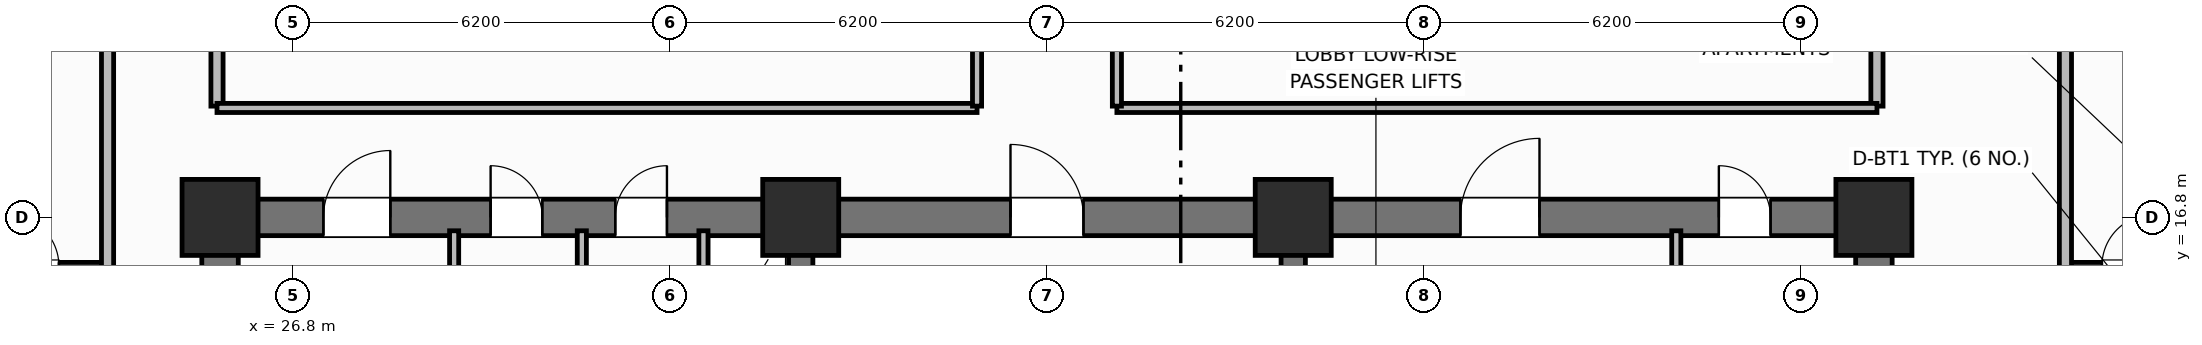
"""IFC4 building model, lengths in metres.
Left out: names, types, materials, properties, quantities, classifications, styles, units other than length and angle.
Written with IfcOpenShell. Run it as: python <this file> out.ifc"""

import sys

from ifc_helpers import new_model, si_unit, direction, frame, frame_2d, origin, origin_2d, place, context, subcontext, project, spatial, rectangle, extrude, element, fill, save


model = new_model("IFC4")
c1 = context("Model", 3, precision=1e-05, world=origin(), true_north=direction((0.0, 1.0)))
c2 = subcontext(c1, "Body", "Model", "MODEL_VIEW")
j1 = project(units=[si_unit("LENGTHUNIT", "METRE"), si_unit("PLANEANGLEUNIT", "RADIAN")], contexts=[c1])
p1 = place(None, origin())
s1 = spatial("IfcSite", under=j1, at=p1, CompositionType="ELEMENT")
p2 = place(p1, origin())
s2 = spatial("IfcBuilding", under=s1, at=p2, CompositionType="ELEMENT")
p3 = place(p2, frame((0.0, 0.0, 69.5)))
s3 = spatial("IfcBuildingStorey", under=s2, at=p3, CompositionType="ELEMENT", Elevation=69.5)
for number, where, z_axis, x_axis in (
    (1, (25.6, 10.9, 0.0), (0.0, 0.0, 1.0), (0.0, 1.0, 0.0)),
    (2, (52.8, 10.9, 0.0), (0.0, 0.0, 1.0), (0.0, 1.0, 0.0)),
):
    element("IfcWall", number, at=place(p3, frame(where, z_axis=z_axis, x_axis=x_axis)), inside=s3, PredefinedType="SHEAR", context=c2, shape_type="SweptSolid", body=[
        extrude(rectangle(XDim=5.6, YDim=0.6, at=frame_2d((2.8, 0.0))), origin(), (0.0, 0.0, 1.0), 3.7),
    ])
p4 = place(p3, frame((25.6, 16.8, 0.0), z_axis=(0.0, 0.0, 1.0), x_axis=(1.0, 0.0, 0.0)))
e3 = element("IfcWall", 3, at=p4, inside=s3, PredefinedType="SHEAR", context=c2, shape_type="SweptSolid", body=[
    extrude(rectangle(XDim=27.2, YDim=0.6, at=frame_2d((13.6, 0.0))), origin(), (0.0, 0.0, 1.0), 3.7),
])
p5 = place(p4, frame((1.7, 0.0, 0.0)))
e4 = element("IfcOpeningElement", 4, at=p5, cuts=e3, PredefinedType="OPENING", context=c2, shape_type="SweptSolid", body=[
    extrude(rectangle(XDim=1.1, YDim=2.15, at=frame_2d((0.55, 1.075))), frame((0.0, 0.31, 0.0), z_axis=(0.0, -1.0, 0.0), x_axis=(1.0, 0.0, 0.0)), (0.0, 0.0, 1.0), 0.62),
])
p6 = place(p4, frame((4.45, 0.0, 0.0)))
e5 = element("IfcOpeningElement", 5, at=p6, cuts=e3, PredefinedType="OPENING", context=c2, shape_type="SweptSolid", body=[
    extrude(rectangle(XDim=0.85, YDim=2.1, at=frame_2d((0.425, 1.05))), frame((0.0, 0.31, 0.0), z_axis=(0.0, -1.0, 0.0), x_axis=(1.0, 0.0, 0.0)), (0.0, 0.0, 1.0), 0.62),
])
p7 = place(p4, frame((6.5, 0.0, 0.0)))
e6 = element("IfcOpeningElement", 6, at=p7, cuts=e3, PredefinedType="OPENING", context=c2, shape_type="SweptSolid", body=[
    extrude(rectangle(XDim=0.85, YDim=2.1, at=frame_2d((0.425, 1.05))), frame((0.0, 0.31, 0.0), z_axis=(0.0, -1.0, 0.0), x_axis=(1.0, 0.0, 0.0)), (0.0, 0.0, 1.0), 0.62),
])
p8 = place(p4, frame((13.0, 0.0, 0.0)))
e7 = element("IfcOpeningElement", 7, at=p8, cuts=e3, PredefinedType="OPENING", context=c2, shape_type="SweptSolid", body=[
    extrude(rectangle(XDim=1.2, YDim=2.15, at=frame_2d((0.6, 1.075))), frame((0.0, 0.31, 0.0), z_axis=(0.0, -1.0, 0.0), x_axis=(1.0, 0.0, 0.0)), (0.0, 0.0, 1.0), 0.62),
])
p9 = place(p4, frame((20.4, 0.0, 0.0)))
e8 = element("IfcOpeningElement", 8, at=p9, cuts=e3, PredefinedType="OPENING", context=c2, shape_type="SweptSolid", body=[
    extrude(rectangle(XDim=1.3, YDim=2.2, at=frame_2d((0.65, 1.1))), frame((0.0, 0.31, 0.0), z_axis=(0.0, -1.0, 0.0), x_axis=(1.0, 0.0, 0.0)), (0.0, 0.0, 1.0), 0.62),
])
p10 = place(p4, frame((24.65, 0.0, 0.0)))
e9 = element("IfcOpeningElement", 9, at=p10, cuts=e3, PredefinedType="OPENING", context=c2, shape_type="SweptSolid", body=[
    extrude(rectangle(XDim=0.85, YDim=2.1, at=frame_2d((0.425, 1.05))), frame((0.0, 0.31, 0.0), z_axis=(0.0, -1.0, 0.0), x_axis=(1.0, 0.0, 0.0)), (0.0, 0.0, 1.0), 0.62),
])
for number, where, z_axis, x_axis in (
    (10, (35.15, 10.9, 0.0), (0.0, 0.0, 1.0), (0.0, 1.0, 0.0)),
    (11, (43.25, 10.9, 0.0), (0.0, 0.0, 1.0), (0.0, 1.0, 0.0)),
):
    element("IfcWall", number, at=place(p3, frame(where, z_axis=z_axis, x_axis=x_axis)), inside=s3, PredefinedType="SHEAR", context=c2, shape_type="SweptSolid", body=[
        extrude(rectangle(XDim=5.6, YDim=0.4, at=frame_2d((2.8, 0.0))), origin(), (0.0, 0.0, 1.0), 3.7),
    ])
for number, where, z_axis, x_axis in (
    (12, (25.6, 16.8, 0.0), (0.0, 0.0, 1.0), (1.0, 0.0, 0.0)),
    (13, (35.15, 16.8, 0.0), (0.0, 0.0, 1.0), (1.0, 0.0, 0.0)),
    (14, (43.25, 16.8, 0.0), (0.0, 0.0, 1.0), (1.0, 0.0, 0.0)),
    (15, (52.8, 16.8, 0.0), (0.0, 0.0, 1.0), (1.0, 0.0, 0.0)),
):
    element("IfcColumn", number, at=place(p3, frame(where, z_axis=z_axis, x_axis=x_axis)), inside=s3, PredefinedType="COLUMN", context=c2, shape_type="SweptSolid", body=[
        extrude(rectangle(XDim=1.25, YDim=1.25, at=origin_2d()), origin(), (0.0, 0.0, 1.0), 3.7),
    ])
for number, where, z_axis, x_axis in (
    (16, (29.45, 14.5, 0.0), (0.0, 0.0, 1.0), (0.0, 1.0, 0.0)),
    (17, (31.55, 14.5, 0.0), (0.0, 0.0, 1.0), (0.0, 1.0, 0.0)),
):
    element("IfcWall", number, at=place(p3, frame(where, z_axis=z_axis, x_axis=x_axis)), inside=s3, PredefinedType="PARTITIONING", context=c2, shape_type="SweptSolid", body=[
        extrude(rectangle(XDim=2.08, YDim=0.15, at=frame_2d((1.04, 0.0))), origin(), (0.0, 0.0, 1.0), 2.53),
    ])
p11 = place(p3, frame((33.55, 14.5, 0.0), z_axis=(0.0, 0.0, 1.0), x_axis=(0.0, 1.0, 0.0)))
e18 = element("IfcWall", 18, at=p11, inside=s3, PredefinedType="PARTITIONING", context=c2, shape_type="SweptSolid", body=[
    extrude(rectangle(XDim=2.08, YDim=0.15, at=frame_2d((1.04, 0.0))), origin(), (0.0, 0.0, 1.0), 2.53),
])
p12 = place(p11, frame((0.55, 0.0, 0.0)))
e19 = element("IfcOpeningElement", 19, at=p12, cuts=e18, PredefinedType="OPENING", context=c2, shape_type="SweptSolid", body=[
    extrude(rectangle(XDim=0.85, YDim=2.05, at=frame_2d((0.425, 1.025))), frame((0.0, 0.085, 0.0), z_axis=(0.0, -1.0, 0.0), x_axis=(1.0, 0.0, 0.0)), (0.0, 0.0, 1.0), 0.17),
])
p13 = place(p3, frame((49.55, 13.7, 0.0), z_axis=(0.0, 0.0, 1.0), x_axis=(0.0, 1.0, 0.0)))
e20 = element("IfcWall", 20, at=p13, inside=s3, PredefinedType="PARTITIONING", context=c2, shape_type="SweptSolid", body=[
    extrude(rectangle(XDim=2.88, YDim=0.15, at=frame_2d((1.44, 0.0))), origin(), (0.0, 0.0, 1.0), 2.53),
])
for number, where, z_axis, x_axis in (
    (21, (25.55, 18.63, 0.0), (0.0, 0.0, 1.0), (0.0, 1.0, 0.0)),
    (22, (52.85, 18.63, 0.0), (0.0, 0.0, 1.0), (0.0, 1.0, 0.0)),
):
    element("IfcWall", number, at=place(p3, frame(where, z_axis=z_axis, x_axis=x_axis)), inside=s3, PredefinedType="PARTITIONING", context=c2, shape_type="SweptSolid", body=[
        extrude(rectangle(XDim=19.14, YDim=0.2, at=frame_2d((9.57, 0.0))), origin(), (0.0, 0.0, 1.0), 2.53),
    ])
for number, where, z_axis, x_axis in (
    (23, (25.55, 18.6, 0.0), (0.0, 0.0, 1.0), (1.0, 0.0, 0.0)),
    (24, (40.35, 18.6, 0.0), (0.0, 0.0, 1.0), (1.0, 0.0, 0.0)),
):
    element("IfcWall", number, at=place(p3, frame(where, z_axis=z_axis, x_axis=x_axis)), inside=s3, PredefinedType="PARTITIONING", context=c2, shape_type="SweptSolid", body=[
        extrude(rectangle(XDim=12.5, YDim=0.15, at=frame_2d((6.25, 0.0))), origin(), (0.0, 0.0, 1.0), 2.53),
    ])
p14 = place(p3, frame((38.05, 18.63, 0.0), z_axis=(0.0, 0.0, 1.0), x_axis=(0.0, 1.0, 0.0)))
e25 = element("IfcWall", 25, at=p14, inside=s3, PredefinedType="PARTITIONING", context=c2, shape_type="SweptSolid", body=[
    extrude(rectangle(XDim=19.14, YDim=0.15, at=frame_2d((9.57, 0.0))), origin(), (0.0, 0.0, 1.0), 2.53),
])
p15 = place(p14, frame((2.2, 0.0, 0.0)))
e26 = element("IfcOpeningElement", 26, at=p15, cuts=e25, PredefinedType="OPENING", context=c2, shape_type="SweptSolid", body=[
    extrude(rectangle(XDim=1.0, YDim=2.15, at=frame_2d((0.5, 1.075))), frame((0.0, 0.085, 0.0), z_axis=(0.0, -1.0, 0.0), x_axis=(1.0, 0.0, 0.0)), (0.0, 0.0, 1.0), 0.17),
])
p16 = place(p14, frame((12.518, 0.0, 0.0)))
e27 = element("IfcOpeningElement", 27, at=p16, cuts=e25, PredefinedType="OPENING", context=c2, shape_type="SweptSolid", body=[
    extrude(rectangle(XDim=1.0, YDim=2.15, at=frame_2d((0.5, 1.075))), frame((0.0, 0.085, 0.0), z_axis=(0.0, -1.0, 0.0), x_axis=(1.0, 0.0, 0.0)), (0.0, 0.0, 1.0), 0.17),
])
p17 = place(p3, frame((40.35, 18.63, 0.0), z_axis=(0.0, 0.0, 1.0), x_axis=(0.0, 1.0, 0.0)))
e28 = element("IfcWall", 28, at=p17, inside=s3, PredefinedType="PARTITIONING", context=c2, shape_type="SweptSolid", body=[
    extrude(rectangle(XDim=19.14, YDim=0.15, at=frame_2d((9.57, 0.0))), origin(), (0.0, 0.0, 1.0), 2.53),
])
p18 = place(p17, frame((2.2, 0.0, 0.0)))
e29 = element("IfcOpeningElement", 29, at=p18, cuts=e28, PredefinedType="OPENING", context=c2, shape_type="SweptSolid", body=[
    extrude(rectangle(XDim=1.0, YDim=2.15, at=frame_2d((0.5, 1.075))), frame((0.0, 0.085, 0.0), z_axis=(0.0, -1.0, 0.0), x_axis=(1.0, 0.0, 0.0)), (0.0, 0.0, 1.0), 0.17),
])
p19 = place(p17, frame((12.518, 0.0, 0.0)))
e30 = element("IfcOpeningElement", 30, at=p19, cuts=e28, PredefinedType="OPENING", context=c2, shape_type="SweptSolid", body=[
    extrude(rectangle(XDim=0.9, YDim=2.1, at=frame_2d((0.45, 1.05))), frame((0.0, 0.085, 0.0), z_axis=(0.0, -1.0, 0.0), x_axis=(1.0, 0.0, 0.0)), (0.0, 0.0, 1.0), 0.17),
])
p20 = place(p3, frame((21.5, 16.0, 0.0), z_axis=(0.0, 0.0, 1.0), x_axis=(1.0, 0.0, 0.0)))
e31 = element("IfcWall", 31, at=p20, inside=s3, PredefinedType="PARTITIONING", context=c2, shape_type="SweptSolid", body=[
    extrude(rectangle(XDim=2.25, YDim=0.12, at=frame_2d((1.125, 0.0))), origin(), (0.0, 0.0, 1.0), 2.53),
])
p21 = place(p20, frame((0.6, 0.0, 0.0)))
e32 = element("IfcOpeningElement", 32, at=p21, cuts=e31, PredefinedType="OPENING", context=c2, shape_type="SweptSolid", body=[
    extrude(rectangle(XDim=0.85, YDim=2.1, at=frame_2d((0.425, 1.05))), frame((0.0, 0.07, 0.0), z_axis=(0.0, -1.0, 0.0), x_axis=(1.0, 0.0, 0.0)), (0.0, 0.0, 1.0), 0.14),
])
p22 = place(p3, frame((23.75, 10.6, 0.0), z_axis=(0.0, 0.0, 1.0), x_axis=(0.0, 1.0, 0.0)))
e33 = element("IfcWall", 33, at=p22, inside=s3, PredefinedType="PARTITIONING", context=c2, shape_type="SweptSolid", body=[
    extrude(rectangle(XDim=35.2, YDim=0.2, at=frame_2d((17.6, 0.0))), origin(), (0.0, 0.0, 1.0), 2.53),
])
p23 = place(p22, frame((2.65, 0.0, 0.0)))
e34 = element("IfcOpeningElement", 34, at=p23, cuts=e33, PredefinedType="OPENING", context=c2, shape_type="SweptSolid", body=[
    extrude(rectangle(XDim=1.0, YDim=2.15, at=frame_2d((0.5, 1.075))), frame((0.0, 0.11, 0.0), z_axis=(0.0, -1.0, 0.0), x_axis=(1.0, 0.0, 0.0)), (0.0, 0.0, 1.0), 0.22),
])
p24 = place(p22, frame((13.222, 0.0, 0.0)))
e35 = element("IfcOpeningElement", 35, at=p24, cuts=e33, PredefinedType="OPENING", context=c2, shape_type="SweptSolid", body=[
    extrude(rectangle(XDim=1.0, YDim=2.15, at=frame_2d((0.5, 1.075))), frame((0.0, 0.11, 0.0), z_axis=(0.0, -1.0, 0.0), x_axis=(1.0, 0.0, 0.0)), (0.0, 0.0, 1.0), 0.22),
])
p25 = place(p22, frame((25.19, 0.0, 0.0)))
e36 = element("IfcOpeningElement", 36, at=p25, cuts=e33, PredefinedType="OPENING", context=c2, shape_type="SweptSolid", body=[
    extrude(rectangle(XDim=1.0, YDim=2.15, at=frame_2d((0.5, 1.075))), frame((0.0, 0.11, 0.0), z_axis=(0.0, -1.0, 0.0), x_axis=(1.0, 0.0, 0.0)), (0.0, 0.0, 1.0), 0.22),
])
p26 = place(p3, frame((55.95, 16.0, 0.0), z_axis=(0.0, 0.0, 1.0), x_axis=(1.0, 0.0, 0.0)))
e37 = element("IfcWall", 37, at=p26, inside=s3, PredefinedType="PARTITIONING", context=c2, shape_type="SweptSolid", body=[
    extrude(rectangle(XDim=2.25, YDim=0.12, at=frame_2d((1.125, 0.0))), origin(), (0.0, 0.0, 1.0), 2.53),
])
p27 = place(p26, frame((0.6, 0.0, 0.0)))
e38 = element("IfcOpeningElement", 38, at=p27, cuts=e37, PredefinedType="OPENING", context=c2, shape_type="SweptSolid", body=[
    extrude(rectangle(XDim=0.85, YDim=2.1, at=frame_2d((0.425, 1.05))), frame((0.0, 0.07, 0.0), z_axis=(0.0, -1.0, 0.0), x_axis=(1.0, 0.0, 0.0)), (0.0, 0.0, 1.0), 0.14),
])
p28 = place(p3, frame((55.95, 10.6, 0.0), z_axis=(0.0, 0.0, 1.0), x_axis=(0.0, 1.0, 0.0)))
e39 = element("IfcWall", 39, at=p28, inside=s3, PredefinedType="PARTITIONING", context=c2, shape_type="SweptSolid", body=[
    extrude(rectangle(XDim=35.2, YDim=0.2, at=frame_2d((17.6, 0.0))), origin(), (0.0, 0.0, 1.0), 2.53),
])
p29 = place(p28, frame((2.65, 0.0, 0.0)))
e40 = element("IfcOpeningElement", 40, at=p29, cuts=e39, PredefinedType="OPENING", context=c2, shape_type="SweptSolid", body=[
    extrude(rectangle(XDim=1.0, YDim=2.15, at=frame_2d((0.5, 1.075))), frame((0.0, 0.11, 0.0), z_axis=(0.0, -1.0, 0.0), x_axis=(1.0, 0.0, 0.0)), (0.0, 0.0, 1.0), 0.22),
])
p30 = place(p28, frame((12.87, 0.0, 0.0)))
e41 = element("IfcOpeningElement", 41, at=p30, cuts=e39, PredefinedType="OPENING", context=c2, shape_type="SweptSolid", body=[
    extrude(rectangle(XDim=1.0, YDim=2.15, at=frame_2d((0.5, 1.075))), frame((0.0, 0.11, 0.0), z_axis=(0.0, -1.0, 0.0), x_axis=(1.0, 0.0, 0.0)), (0.0, 0.0, 1.0), 0.22),
])
p31 = place(p28, frame((23.65, 0.0, 0.0)))
e42 = element("IfcOpeningElement", 42, at=p31, cuts=e39, PredefinedType="OPENING", context=c2, shape_type="SweptSolid", body=[
    extrude(rectangle(XDim=1.0, YDim=2.15, at=frame_2d((0.5, 1.075))), frame((0.0, 0.11, 0.0), z_axis=(0.0, -1.0, 0.0), x_axis=(1.0, 0.0, 0.0)), (0.0, 0.0, 1.0), 0.22),
])
p32 = place(p21, origin())
e43 = element("IfcDoor", 43, at=p32, inside=s3, OperationType="SINGLE_SWING_LEFT", PredefinedType="DOOR", context=c2, shape_type="SweptSolid", body=[
    extrude(rectangle(XDim=0.85, YDim=2.1, at=frame_2d((0.425, 1.05))), frame((0.0, 0.025, 0.0), z_axis=(0.0, -1.0, 0.0), x_axis=(1.0, 0.0, 0.0)), (0.0, 0.0, 1.0), 0.05),
])
fill(e32, e43)
p33 = place(p27, origin())
e44 = element("IfcDoor", 44, at=p33, inside=s3, OperationType="SINGLE_SWING_RIGHT", PredefinedType="DOOR", context=c2, shape_type="SweptSolid", body=[
    extrude(rectangle(XDim=0.85, YDim=2.1, at=frame_2d((0.425, 1.05))), frame((0.0, 0.025, 0.0), z_axis=(0.0, -1.0, 0.0), x_axis=(1.0, 0.0, 0.0)), (0.0, 0.0, 1.0), 0.05),
])
fill(e38, e44)
p34 = place(p5, origin())
e45 = element("IfcDoor", 45, at=p34, inside=s3, OperationType="SINGLE_SWING_RIGHT", PredefinedType="DOOR", context=c2, shape_type="SweptSolid", body=[
    extrude(rectangle(XDim=1.1, YDim=2.15, at=frame_2d((0.55, 1.075))), frame((0.0, 0.025, 0.0), z_axis=(0.0, -1.0, 0.0), x_axis=(1.0, 0.0, 0.0)), (0.0, 0.0, 1.0), 0.05),
])
fill(e4, e45)
p35 = place(p6, origin())
e46 = element("IfcDoor", 46, at=p35, inside=s3, OperationType="SINGLE_SWING_LEFT", PredefinedType="DOOR", context=c2, shape_type="SweptSolid", body=[
    extrude(rectangle(XDim=0.85, YDim=2.1, at=frame_2d((0.425, 1.05))), frame((0.0, 0.025, 0.0), z_axis=(0.0, -1.0, 0.0), x_axis=(1.0, 0.0, 0.0)), (0.0, 0.0, 1.0), 0.05),
])
fill(e5, e46)
p36 = place(p7, origin())
e47 = element("IfcDoor", 47, at=p36, inside=s3, OperationType="SINGLE_SWING_RIGHT", PredefinedType="DOOR", context=c2, shape_type="SweptSolid", body=[
    extrude(rectangle(XDim=0.85, YDim=2.1, at=frame_2d((0.425, 1.05))), frame((0.0, 0.025, 0.0), z_axis=(0.0, -1.0, 0.0), x_axis=(1.0, 0.0, 0.0)), (0.0, 0.0, 1.0), 0.05),
])
fill(e6, e47)
p37 = place(p8, origin())
e48 = element("IfcDoor", 48, at=p37, inside=s3, OperationType="SINGLE_SWING_LEFT", PredefinedType="DOOR", context=c2, shape_type="SweptSolid", body=[
    extrude(rectangle(XDim=1.2, YDim=2.15, at=frame_2d((0.6, 1.075))), frame((0.0, 0.025, 0.0), z_axis=(0.0, -1.0, 0.0), x_axis=(1.0, 0.0, 0.0)), (0.0, 0.0, 1.0), 0.05),
])
fill(e7, e48)
p38 = place(p9, origin())
e49 = element("IfcDoor", 49, at=p38, inside=s3, OperationType="SINGLE_SWING_RIGHT", PredefinedType="DOOR", context=c2, shape_type="SweptSolid", body=[
    extrude(rectangle(XDim=1.3, YDim=2.2, at=frame_2d((0.65, 1.1))), frame((0.0, 0.025, 0.0), z_axis=(0.0, -1.0, 0.0), x_axis=(1.0, 0.0, 0.0)), (0.0, 0.0, 1.0), 0.05),
])
fill(e8, e49)
p39 = place(p10, origin())
e50 = element("IfcDoor", 50, at=p39, inside=s3, OperationType="SINGLE_SWING_LEFT", PredefinedType="DOOR", context=c2, shape_type="SweptSolid", body=[
    extrude(rectangle(XDim=0.85, YDim=2.1, at=frame_2d((0.425, 1.05))), frame((0.0, 0.025, 0.0), z_axis=(0.0, -1.0, 0.0), x_axis=(1.0, 0.0, 0.0)), (0.0, 0.0, 1.0), 0.05),
])
fill(e9, e50)
save(model, sys.argv[1])
